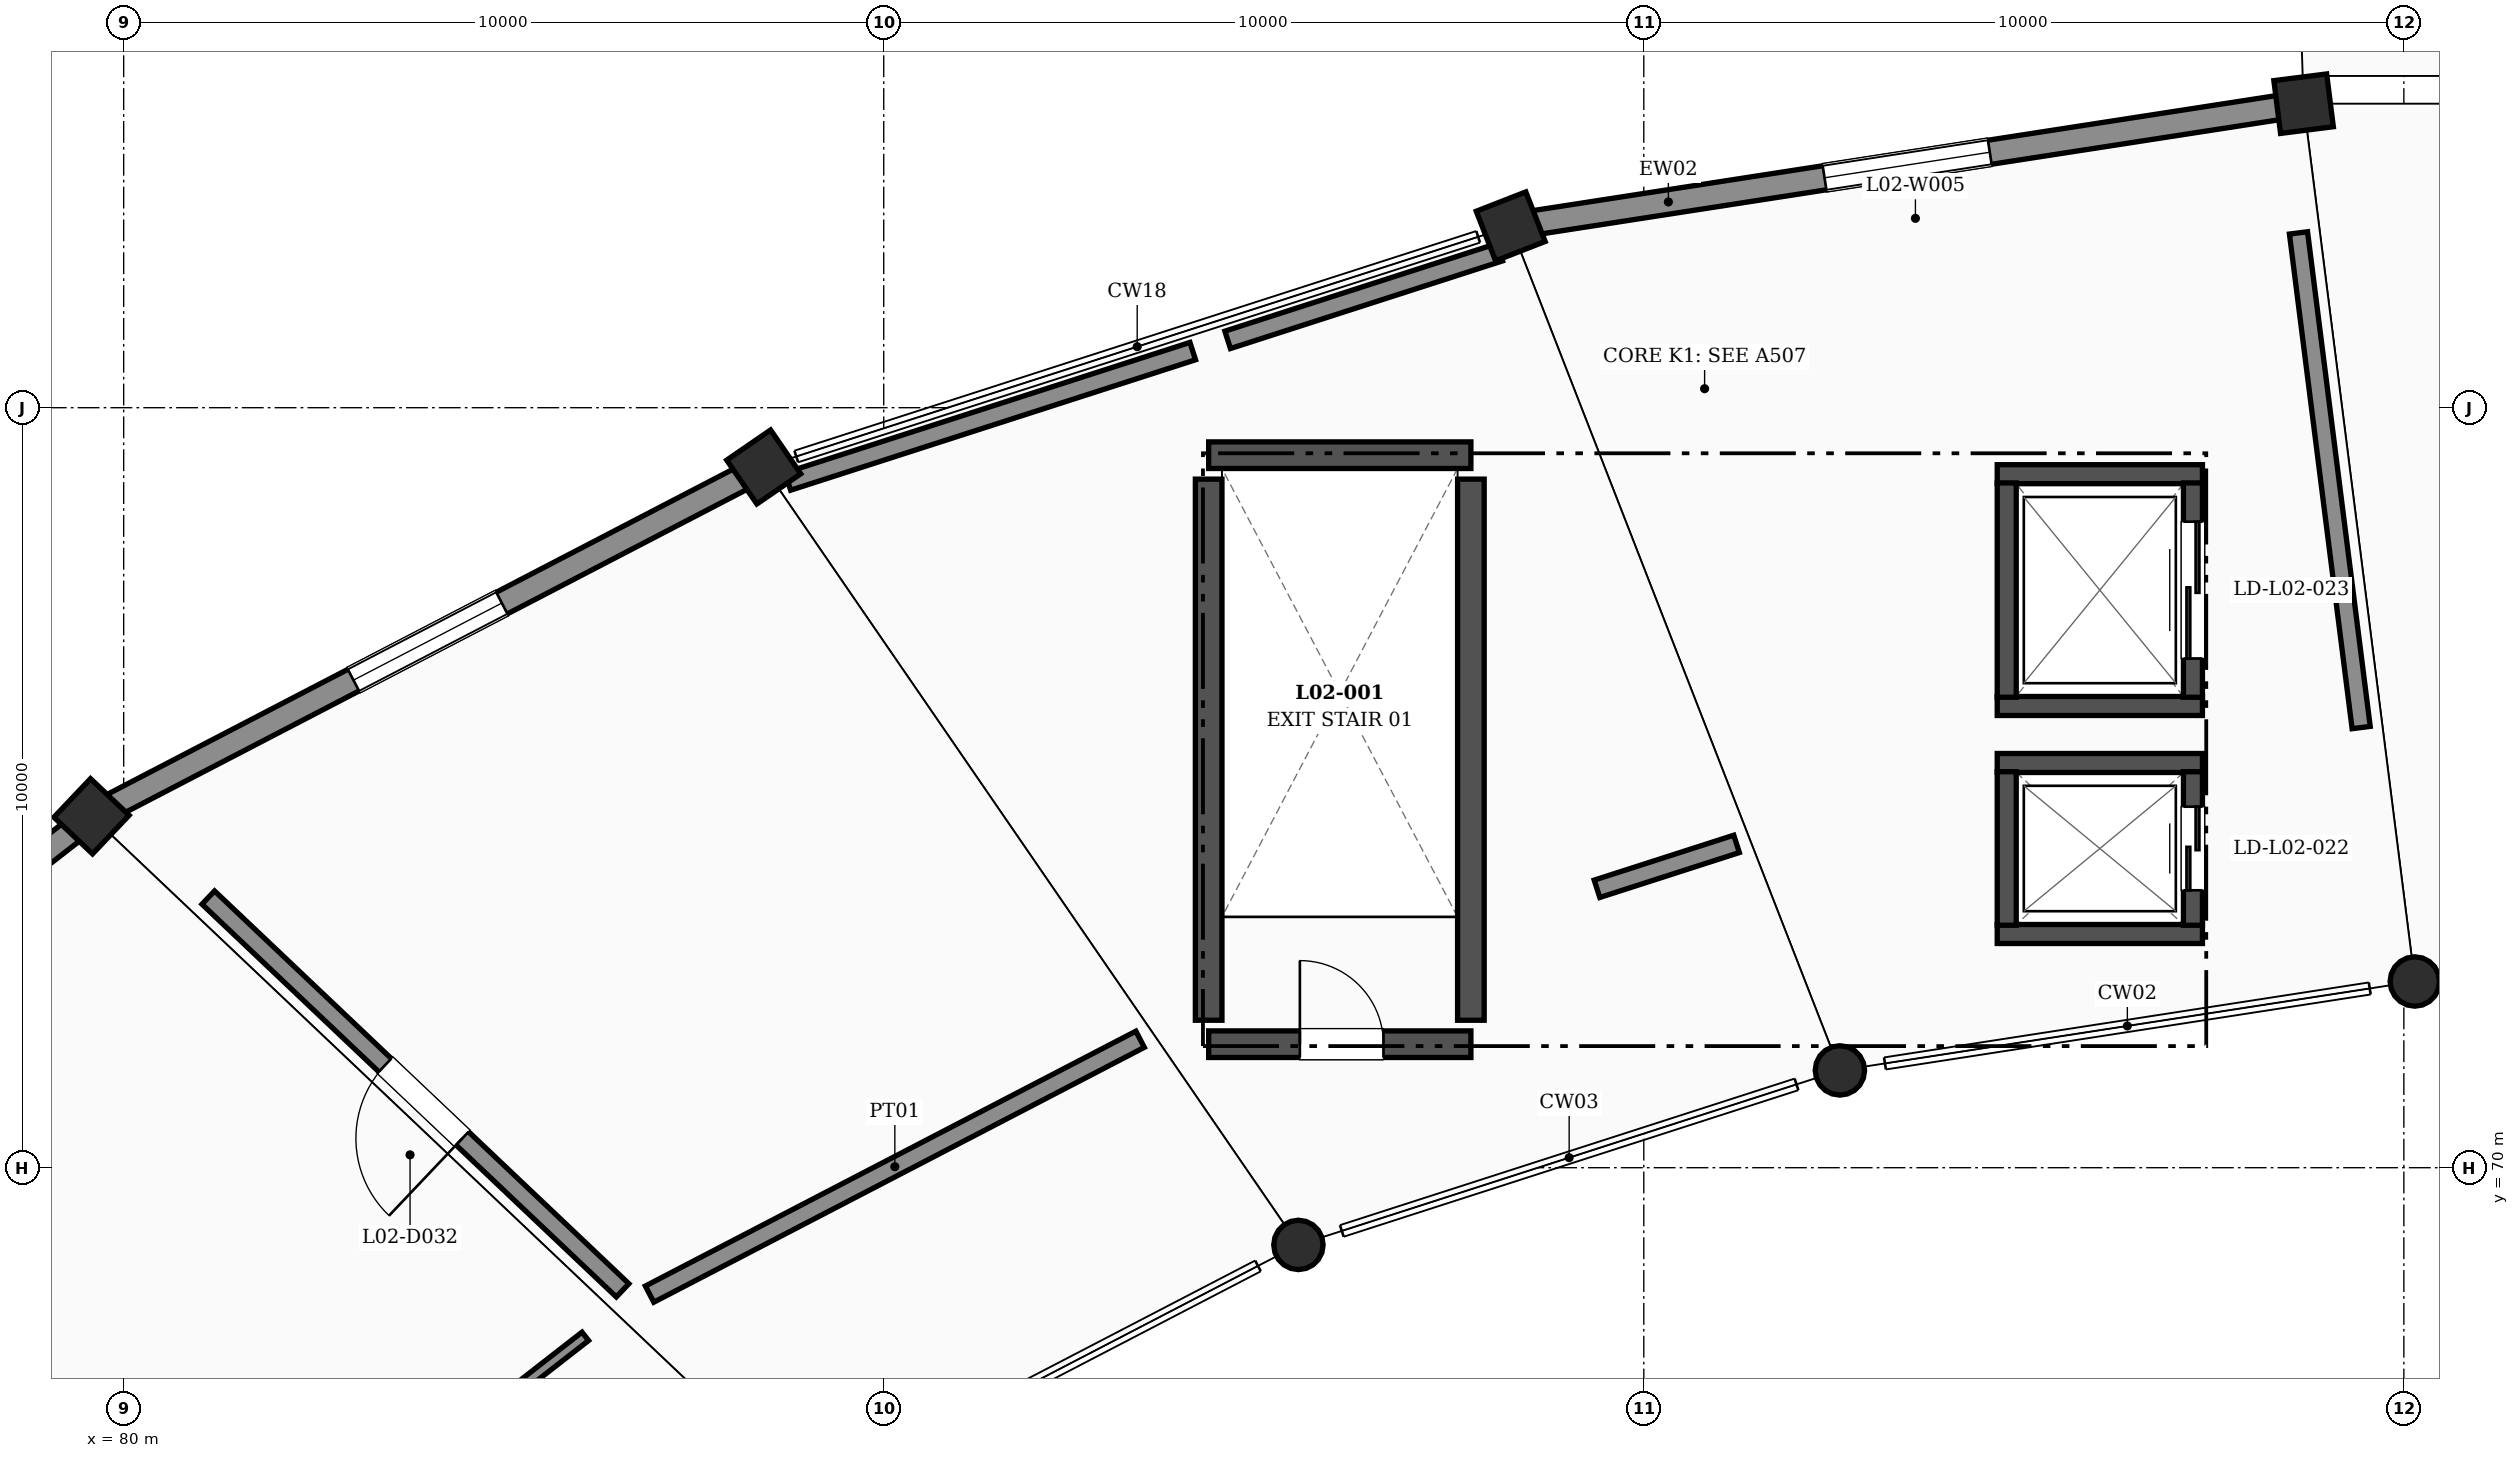
"""IFC4 building model, lengths in metres.
Left out: names, types, materials, properties, quantities, classifications, styles, units other than length and angle.
Written with IfcOpenShell. Run it as: python <this file> out.ifc"""

import sys

from ifc_helpers import new_model, si_unit, direction, frame, frame_2d, origin, origin_2d, place, context, subcontext, project, spatial, rectangle, circle, extrude, element, fill, save


model = new_model("IFC4")
c1 = context("Model", 3, precision=1e-05, world=origin(), true_north=direction((0.0, 1.0)))
c2 = subcontext(c1, "Body", "Model", "MODEL_VIEW")
j1 = project(units=[si_unit("LENGTHUNIT", "METRE"), si_unit("PLANEANGLEUNIT", "RADIAN")], contexts=[c1])
p1 = place(None, origin())
s1 = spatial("IfcSite", under=j1, at=p1, CompositionType="ELEMENT")
p2 = place(p1, origin())
s2 = spatial("IfcBuilding", under=s1, at=p2, CompositionType="ELEMENT")
p3 = place(p2, frame((0.0, 0.0, 10.8)))
s3 = spatial("IfcBuildingStorey", under=s2, at=p3, CompositionType="ELEMENT", Elevation=10.8)
p4 = place(p3, frame((108.681, 84.0, 0.0), z_axis=(0.0, 0.0, 1.0), x_axis=(0.992070891321, 0.125679539283, 0.0)))
e1 = element("IfcColumn", 1, at=p4, inside=s3, PredefinedType="COLUMN", context=c2, shape_type="SweptSolid", body=[
    extrude(rectangle(XDim=0.7, YDim=0.7, at=origin_2d()), origin(), (0.0, 0.0, 1.0), 4.2),
])
p5 = place(p3, frame((110.144, 72.45, 0.0), z_axis=(0.0, 0.0, 1.0), x_axis=(1.0, 0.0, 0.0)))
e2 = element("IfcColumn", 2, at=p5, inside=s3, PredefinedType="COLUMN", context=c2, shape_type="SweptSolid", body=[
    extrude(circle(Radius=0.325, at=origin_2d()), origin(), (0.0, 0.0, 1.0), 4.2),
])
p6 = place(p3, frame((98.249, 82.386, 0.0), z_axis=(0.0, 0.0, 1.0), x_axis=(0.931627814096, 0.363413835735, 0.0)))
e3 = element("IfcColumn", 3, at=p6, inside=s3, PredefinedType="COLUMN", context=c2, shape_type="SweptSolid", body=[
    extrude(rectangle(XDim=0.7, YDim=0.7, at=origin_2d()), origin(), (0.0, 0.0, 1.0), 4.2),
])
p7 = place(p3, frame((102.58, 71.28, 0.0), z_axis=(0.0, 0.0, 1.0), x_axis=(1.0, 0.0, 0.0)))
e4 = element("IfcColumn", 4, at=p7, inside=s3, PredefinedType="COLUMN", context=c2, shape_type="SweptSolid", body=[
    extrude(circle(Radius=0.325, at=origin_2d()), origin(), (0.0, 0.0, 1.0), 4.2),
])
p8 = place(p3, frame((88.421, 79.22, 0.0), z_axis=(0.0, 0.0, 1.0), x_axis=(0.824126188622, 0.566406236925, 0.0)))
e5 = element("IfcColumn", 5, at=p8, inside=s3, PredefinedType="COLUMN", context=c2, shape_type="SweptSolid", body=[
    extrude(rectangle(XDim=0.7, YDim=0.7, at=origin_2d()), origin(), (0.0, 0.0, 1.0), 4.2),
])
p9 = place(p3, frame((95.456, 68.984, 0.0), z_axis=(0.0, 0.0, 1.0), x_axis=(1.0, 0.0, 0.0)))
e6 = element("IfcColumn", 6, at=p9, inside=s3, PredefinedType="COLUMN", context=c2, shape_type="SweptSolid", body=[
    extrude(circle(Radius=0.325, at=origin_2d()), origin(), (0.0, 0.0, 1.0), 4.2),
])
p10 = place(p3, frame((79.577, 74.624, 0.0), z_axis=(0.0, 0.0, 1.0), x_axis=(0.687848001144, 0.725854756355, 0.0)))
e7 = element("IfcColumn", 7, at=p10, inside=s3, PredefinedType="COLUMN", context=c2, shape_type="SweptSolid", body=[
    extrude(rectangle(XDim=0.7, YDim=0.7, at=origin_2d()), origin(), (0.0, 0.0, 1.0), 4.2),
])
p11 = place(p3, frame((108.414, 83.959, 0.0), z_axis=(0.0, 0.0, 1.0), x_axis=(-0.988241433344, -0.152901502352, 0.0)))
e8 = element("IfcWall", 8, at=p11, inside=s3, PredefinedType="SOLIDWALL", context=c2, shape_type="SweptSolid", body=[
    extrude(rectangle(XDim=10.016, YDim=0.32, at=frame_2d((5.008, 0.0))), origin(), (0.0, 0.0, 1.0), 2.55),
])
p12 = place(p11, frame((3.908, 0.0, 0.55)))
e9 = element("IfcOpeningElement", 9, at=p12, cuts=e8, PredefinedType="OPENING", context=c2, shape_type="SweptSolid", body=[
    extrude(rectangle(XDim=2.2, YDim=1.8, at=frame_2d((1.1, 0.9))), frame((0.0, 0.17, 0.0), z_axis=(0.0, -1.0, 0.0), x_axis=(1.0, 0.0, 0.0)), (0.0, 0.0, 1.0), 0.34),
])
p13 = place(p3, frame((88.181, 79.095, 0.0), z_axis=(0.0, 0.0, 1.0), x_axis=(-0.887335924519, -0.461123581112, 0.0)))
e10 = element("IfcWall", 10, at=p13, inside=s3, PredefinedType="SOLIDWALL", context=c2, shape_type="SweptSolid", body=[
    extrude(rectangle(XDim=9.427, YDim=0.32, at=frame_2d((4.713, 0.0))), origin(), (0.0, 0.0, 1.0), 2.55),
])
p14 = place(p13, frame((3.613, 0.0, 0.55)))
e11 = element("IfcOpeningElement", 11, at=p14, cuts=e10, PredefinedType="OPENING", context=c2, shape_type="SweptSolid", body=[
    extrude(rectangle(XDim=2.2, YDim=1.8, at=frame_2d((1.1, 0.9))), frame((0.0, 0.17, 0.0), z_axis=(0.0, -1.0, 0.0), x_axis=(1.0, 0.0, 0.0)), (0.0, 0.0, 1.0), 0.34),
])
p15 = place(p3, frame((79.364, 74.458, 0.0), z_axis=(0.0, 0.0, 1.0), x_axis=(-0.789327357341, -0.613972575082, 0.0)))
e12 = element("IfcWall", 12, at=p15, inside=s3, PredefinedType="SOLIDWALL", context=c2, shape_type="SweptSolid", body=[
    extrude(rectangle(XDim=8.99, YDim=0.32, at=frame_2d((4.495, 0.0))), origin(), (0.0, 0.0, 1.0), 2.55),
])
p16 = place(p15, frame((3.395, 0.0, 0.55)))
e13 = element("IfcOpeningElement", 13, at=p16, cuts=e12, PredefinedType="OPENING", context=c2, shape_type="SweptSolid", body=[
    extrude(rectangle(XDim=1.8, YDim=1.8, at=frame_2d((0.9, 0.9))), frame((0.0, 0.17, 0.0), z_axis=(0.0, -1.0, 0.0), x_axis=(1.0, 0.0, 0.0)), (0.0, 0.0, 1.0), 0.34),
])
p17 = place(p3, frame((94.275, 71.625, 0.0), z_axis=(0.0, 0.0, 1.0), x_axis=(1.0, 0.0, 0.0)))
e14 = element("IfcWall", 14, at=p17, inside=s3, PredefinedType="SHEAR", context=c2, shape_type="SweptSolid", body=[
    extrude(rectangle(XDim=3.45, YDim=0.35, at=frame_2d((1.725, 0.0))), origin(), (0.0, 0.0, 1.0), 3.98),
])
p18 = place(p17, frame((1.2, 0.0, 0.0)))
e15 = element("IfcOpeningElement", 15, at=p18, cuts=e14, PredefinedType="OPENING", context=c2, shape_type="SweptSolid", body=[
    extrude(rectangle(XDim=1.1, YDim=2.2, at=frame_2d((0.55, 1.1))), frame((0.0, 0.185, 0.0), z_axis=(0.0, -1.0, 0.0), x_axis=(1.0, 0.0, 0.0)), (0.0, 0.0, 1.0), 0.37),
])
p19 = place(p3, frame((94.275, 79.375, 0.0), z_axis=(0.0, 0.0, 1.0), x_axis=(1.0, 0.0, 0.0)))
e16 = element("IfcWall", 16, at=p19, inside=s3, PredefinedType="SHEAR", context=c2, shape_type="SweptSolid", body=[
    extrude(rectangle(XDim=3.45, YDim=0.35, at=frame_2d((1.725, 0.0))), origin(), (0.0, 0.0, 1.0), 3.98),
])
for number, where, z_axis, x_axis in (
    (17, (94.275, 71.94, 0.0), (0.0, 0.0, 1.0), (0.0, 1.0, 0.0)),
    (18, (97.725, 71.94, 0.0), (0.0, 0.0, 1.0), (0.0, 1.0, 0.0)),
):
    element("IfcWall", number, at=place(p3, frame(where, z_axis=z_axis, x_axis=x_axis)), inside=s3, PredefinedType="SHEAR", context=c2, shape_type="SweptSolid", body=[
        extrude(rectangle(XDim=7.12, YDim=0.35, at=frame_2d((3.56, 0.0))), origin(), (0.0, 0.0, 1.0), 3.98),
    ])
for number, where, z_axis, x_axis in (
    (19, (104.65, 73.075, 0.0), (0.0, 0.0, 1.0), (1.0, 0.0, 0.0)),
    (20, (104.65, 75.325, 0.0), (0.0, 0.0, 1.0), (1.0, 0.0, 0.0)),
):
    element("IfcWall", number, at=place(p3, frame(where, z_axis=z_axis, x_axis=x_axis)), inside=s3, PredefinedType="SHEAR", context=c2, shape_type="SweptSolid", body=[
        extrude(rectangle(XDim=2.7, YDim=0.25, at=frame_2d((1.35, 0.0))), origin(), (0.0, 0.0, 1.0), 3.98),
    ])
p20 = place(p3, frame((104.775, 73.19, 0.0), z_axis=(0.0, 0.0, 1.0), x_axis=(0.0, 1.0, 0.0)))
e21 = element("IfcWall", 21, at=p20, inside=s3, PredefinedType="SHEAR", context=c2, shape_type="SweptSolid", body=[
    extrude(rectangle(XDim=2.02, YDim=0.25, at=frame_2d((1.01, 0.0))), origin(), (0.0, 0.0, 1.0), 3.98),
])
p21 = place(p3, frame((107.225, 73.19, 0.0), z_axis=(0.0, 0.0, 1.0), x_axis=(0.0, 1.0, 0.0)))
e22 = element("IfcWall", 22, at=p21, inside=s3, PredefinedType="SHEAR", context=c2, shape_type="SweptSolid", body=[
    extrude(rectangle(XDim=2.02, YDim=0.25, at=frame_2d((1.01, 0.0))), origin(), (0.0, 0.0, 1.0), 3.98),
])
p22 = place(p21, frame((0.46, 0.0, 0.0)))
e23 = element("IfcOpeningElement", 23, at=p22, cuts=e22, PredefinedType="OPENING", context=c2, shape_type="SweptSolid", body=[
    extrude(rectangle(XDim=1.1, YDim=2.2, at=frame_2d((0.55, 1.1))), frame((0.0, 0.135, 0.0), z_axis=(0.0, -1.0, 0.0), x_axis=(1.0, 0.0, 0.0)), (0.0, 0.0, 1.0), 0.27),
])
for number, where, z_axis, x_axis in (
    (24, (104.65, 76.075, 0.0), (0.0, 0.0, 1.0), (1.0, 0.0, 0.0)),
    (25, (104.65, 79.125, 0.0), (0.0, 0.0, 1.0), (1.0, 0.0, 0.0)),
):
    element("IfcWall", number, at=place(p3, frame(where, z_axis=z_axis, x_axis=x_axis)), inside=s3, PredefinedType="SHEAR", context=c2, shape_type="SweptSolid", body=[
        extrude(rectangle(XDim=2.7, YDim=0.25, at=frame_2d((1.35, 0.0))), origin(), (0.0, 0.0, 1.0), 3.98),
    ])
p23 = place(p3, frame((104.775, 76.19, 0.0), z_axis=(0.0, 0.0, 1.0), x_axis=(0.0, 1.0, 0.0)))
e26 = element("IfcWall", 26, at=p23, inside=s3, PredefinedType="SHEAR", context=c2, shape_type="SweptSolid", body=[
    extrude(rectangle(XDim=2.82, YDim=0.25, at=frame_2d((1.41, 0.0))), origin(), (0.0, 0.0, 1.0), 3.98),
])
p24 = place(p3, frame((107.225, 76.19, 0.0), z_axis=(0.0, 0.0, 1.0), x_axis=(0.0, 1.0, 0.0)))
e27 = element("IfcWall", 27, at=p24, inside=s3, PredefinedType="SHEAR", context=c2, shape_type="SweptSolid", body=[
    extrude(rectangle(XDim=2.82, YDim=0.25, at=frame_2d((1.41, 0.0))), origin(), (0.0, 0.0, 1.0), 3.98),
])
p25 = place(p24, frame((0.51, 0.0, 0.0)))
e28 = element("IfcOpeningElement", 28, at=p25, cuts=e27, PredefinedType="OPENING", context=c2, shape_type="SweptSolid", body=[
    extrude(rectangle(XDim=1.8, YDim=2.4, at=frame_2d((0.9, 1.2))), frame((0.0, 0.135, 0.0), z_axis=(0.0, -1.0, 0.0), x_axis=(1.0, 0.0, 0.0)), (0.0, 0.0, 1.0), 0.27),
])
p26 = place(p3, frame((88.738, 79.029, 0.0), z_axis=(0.0, 0.0, 1.0), x_axis=(0.951849124053, 0.306566868789, 0.0)))
e29 = element("IfcWall", 29, at=p26, inside=s3, PredefinedType="PARTITIONING", context=c2, shape_type="SweptSolid", body=[
    extrude(rectangle(XDim=5.597, YDim=0.24, at=frame_2d((2.798, 0.0))), origin(), (0.0, 0.0, 1.0), 2.55),
])
p27 = place(p3, frame((94.525, 80.893, 0.0), z_axis=(0.0, 0.0, 1.0), x_axis=(0.951854136637, 0.306551304951, 0.0)))
e30 = element("IfcWall", 30, at=p27, inside=s3, PredefinedType="PARTITIONING", context=c2, shape_type="SweptSolid", body=[
    extrude(rectangle(XDim=3.761, YDim=0.24, at=frame_2d((1.88, 0.0))), origin(), (0.0, 0.0, 1.0), 2.55),
])
p28 = place(p3, frame((108.614, 82.3, 0.0), z_axis=(0.0, 0.0, 1.0), x_axis=(0.12566966592, -0.992072142068, 0.0)))
e31 = element("IfcWall", 31, at=p28, inside=s3, PredefinedType="PARTITIONING", context=c2, shape_type="SweptSolid", body=[
    extrude(rectangle(XDim=6.561, YDim=0.24, at=frame_2d((3.28, 0.0))), origin(), (0.0, 0.0, 1.0), 2.55),
])
p29 = place(p3, frame((101.221, 74.26, 0.0), z_axis=(0.0, 0.0, 1.0), x_axis=(-0.951935015799, -0.306300058268, 0.0)))
e32 = element("IfcWall", 32, at=p29, inside=s3, PredefinedType="PARTITIONING", context=c2, shape_type="SweptSolid", body=[
    extrude(rectangle(XDim=1.929, YDim=0.24, at=frame_2d((0.964, 0.0))), origin(), (0.0, 0.0, 1.0), 2.55),
])
p30 = place(p3, frame((93.373, 71.69, 0.0), z_axis=(0.0, 0.0, 1.0), x_axis=(-0.887363504554, -0.461070505222, 0.0)))
e33 = element("IfcWall", 33, at=p30, inside=s3, PredefinedType="PARTITIONING", context=c2, shape_type="SweptSolid", body=[
    extrude(rectangle(XDim=7.273, YDim=0.24, at=frame_2d((3.636, 0.0))), origin(), (0.0, 0.0, 1.0), 2.55),
])
p31 = place(p3, frame((86.564, 68.386, 0.0), z_axis=(0.0, 0.0, 1.0), x_axis=(-0.725723737428, 0.687986233099, 0.0)))
e34 = element("IfcWall", 34, at=p31, inside=s3, PredefinedType="PARTITIONING", context=c2, shape_type="SweptSolid", body=[
    extrude(rectangle(XDim=7.511, YDim=0.24, at=frame_2d((3.755, 0.0))), origin(), (0.0, 0.0, 1.0), 2.55),
])
p32 = place(p31, frame((2.906, 0.0, 0.0)))
e35 = element("IfcOpeningElement", 35, at=p32, cuts=e34, PredefinedType="OPENING", context=c2, shape_type="SweptSolid", body=[
    extrude(rectangle(XDim=1.4, YDim=2.25, at=frame_2d((0.7, 1.125))), frame((0.0, 0.13, 0.0), z_axis=(0.0, -1.0, 0.0), x_axis=(1.0, 0.0, 0.0)), (0.0, 0.0, 1.0), 0.26),
])
p33 = place(p3, frame((86.073, 67.781, 0.0), z_axis=(0.0, 0.0, 1.0), x_axis=(-0.789176995311, -0.614165832712, 0.0)))
e36 = element("IfcWall", 36, at=p33, inside=s3, PredefinedType="PARTITIONING", context=c2, shape_type="SweptSolid", body=[
    extrude(rectangle(XDim=6.829, YDim=0.14, at=frame_2d((3.414, 0.0))), origin(), (0.0, 0.0, 1.0), 2.55),
])
p34 = place(p12, origin())
e37 = element("IfcWindow", 37, at=p34, inside=s3, PartitioningType="SINGLE_PANEL", PredefinedType="WINDOW", context=c2, shape_type="SweptSolid", body=[
    extrude(rectangle(XDim=2.2, YDim=1.8, at=frame_2d((1.1, 0.9))), frame((0.0, 0.03, 0.0), z_axis=(0.0, -1.0, 0.0), x_axis=(1.0, 0.0, 0.0)), (0.0, 0.0, 1.0), 0.06),
])
fill(e9, e37)
p35 = place(p14, origin())
e38 = element("IfcWindow", 38, at=p35, inside=s3, PartitioningType="SINGLE_PANEL", PredefinedType="WINDOW", context=c2, shape_type="SweptSolid", body=[
    extrude(rectangle(XDim=2.2, YDim=1.8, at=frame_2d((1.1, 0.9))), frame((0.0, 0.03, 0.0), z_axis=(0.0, -1.0, 0.0), x_axis=(1.0, 0.0, 0.0)), (0.0, 0.0, 1.0), 0.06),
])
fill(e11, e38)
p36 = place(p18, origin())
e39 = element("IfcDoor", 39, at=p36, inside=s3, OperationType="SINGLE_SWING_LEFT", PredefinedType="DOOR", context=c2, shape_type="SweptSolid", body=[
    extrude(rectangle(XDim=1.1, YDim=2.2, at=frame_2d((0.55, 1.1))), frame((0.0, 0.025, 0.0), z_axis=(0.0, -1.0, 0.0), x_axis=(1.0, 0.0, 0.0)), (0.0, 0.0, 1.0), 0.05),
])
fill(e15, e39)
p37 = place(p22, origin())
e40 = element("IfcDoor", 40, at=p37, inside=s3, OperationType="DOUBLE_DOOR_SLIDING", PredefinedType="DOOR", context=c2, shape_type="SweptSolid", body=[
    extrude(rectangle(XDim=1.1, YDim=2.2, at=frame_2d((0.55, 1.1))), frame((0.0, 0.025, 0.0), z_axis=(0.0, -1.0, 0.0), x_axis=(1.0, 0.0, 0.0)), (0.0, 0.0, 1.0), 0.05),
])
fill(e23, e40)
p38 = place(p25, origin())
e41 = element("IfcDoor", 41, at=p38, inside=s3, OperationType="DOUBLE_DOOR_SLIDING", PredefinedType="DOOR", context=c2, shape_type="SweptSolid", body=[
    extrude(rectangle(XDim=1.8, YDim=2.4, at=frame_2d((0.9, 1.2))), frame((0.0, 0.025, 0.0), z_axis=(0.0, -1.0, 0.0), x_axis=(1.0, 0.0, 0.0)), (0.0, 0.0, 1.0), 0.05),
])
fill(e28, e41)
p39 = place(p32, origin())
e42 = element("IfcDoor", 42, at=p39, inside=s3, OperationType="SINGLE_SWING_LEFT", PredefinedType="DOOR", context=c2, shape_type="SweptSolid", body=[
    extrude(rectangle(XDim=1.4, YDim=2.25, at=frame_2d((0.7, 1.125))), frame((0.0, 0.025, 0.0), z_axis=(0.0, -1.0, 0.0), x_axis=(1.0, 0.0, 0.0)), (0.0, 0.0, 1.0), 0.05),
])
fill(e35, e42)
save(model, sys.argv[1])
